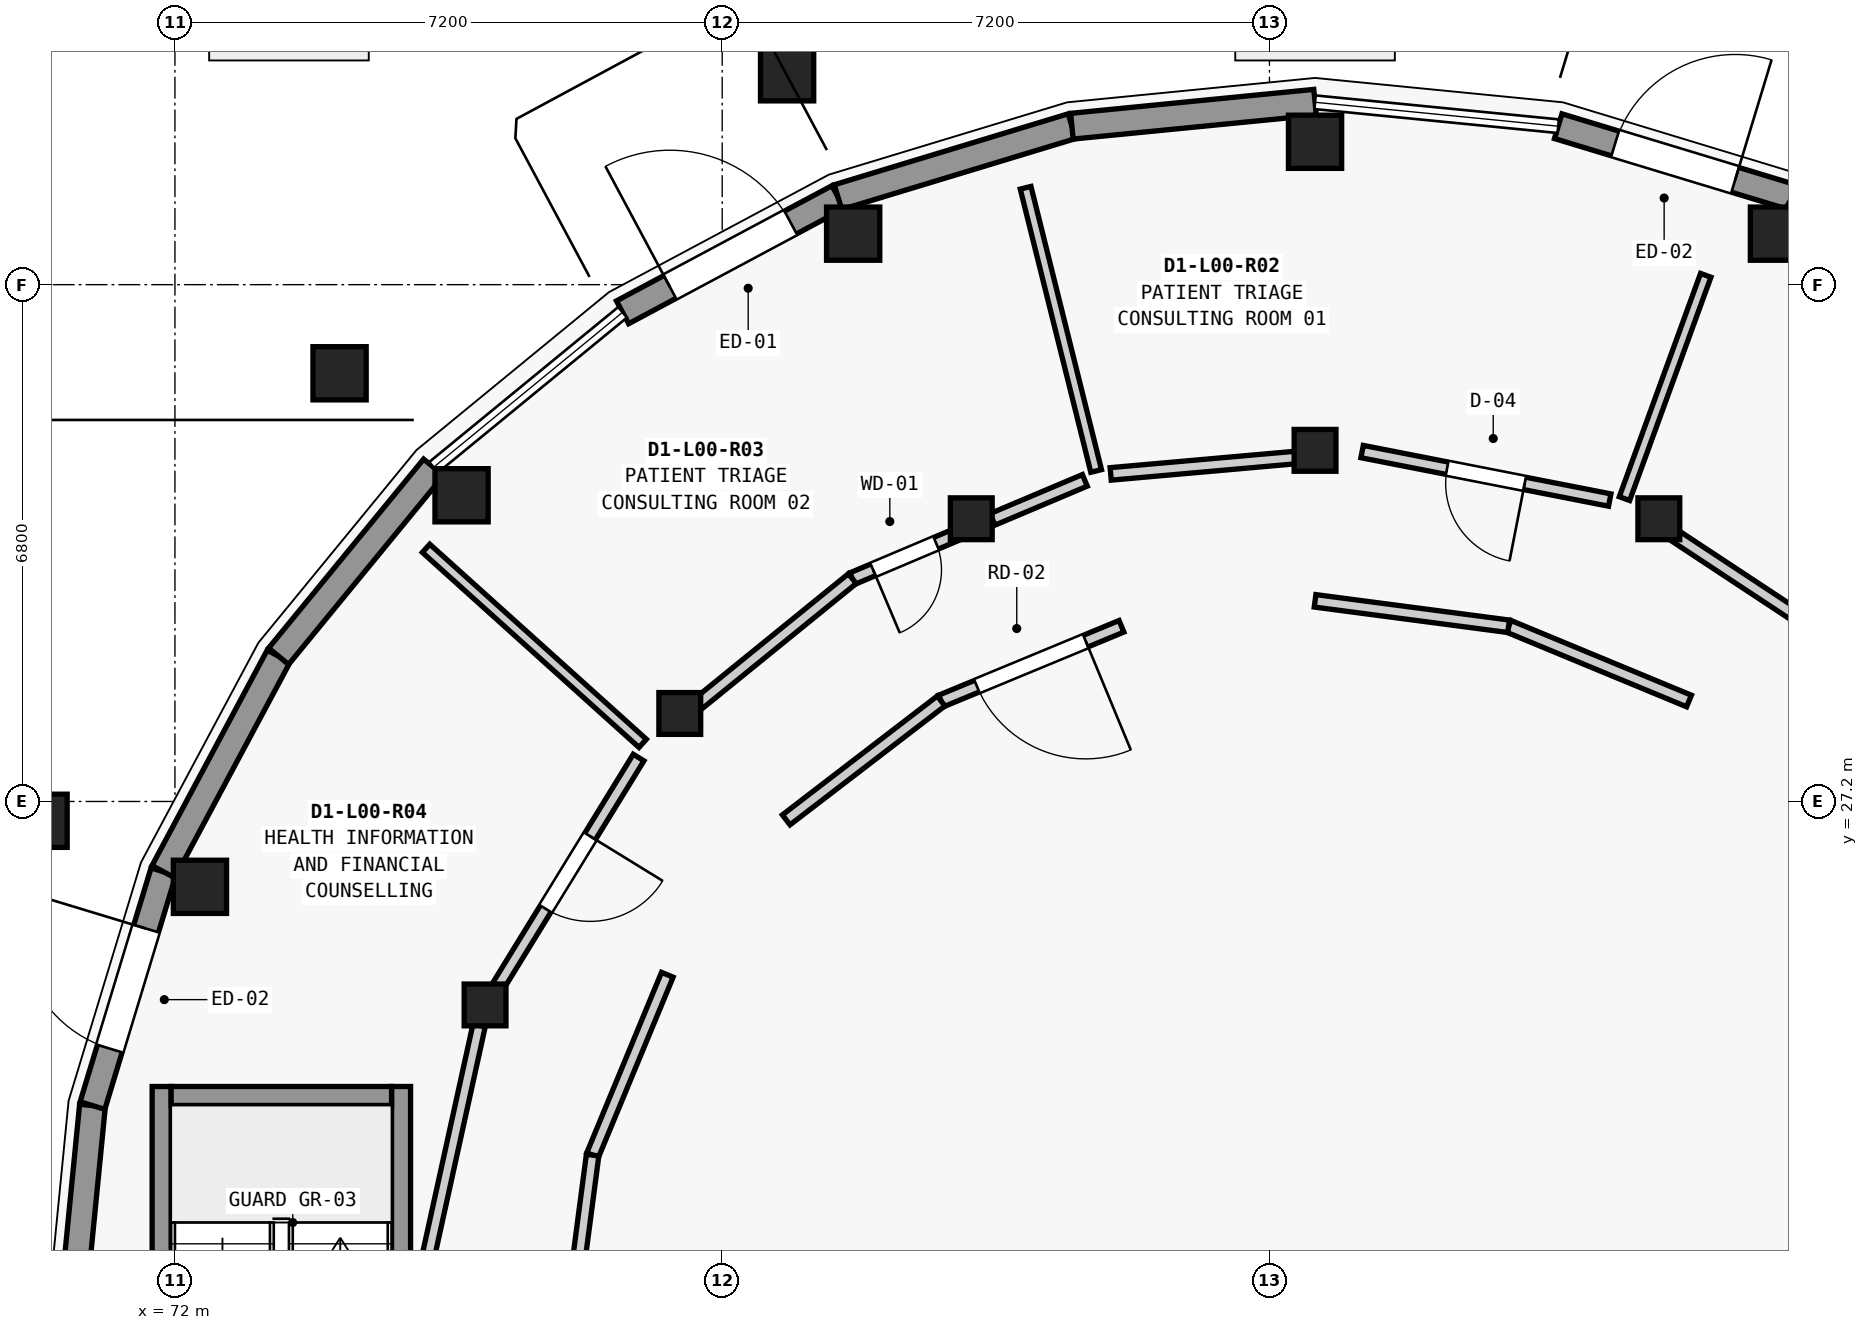
"""IFC4 building model, lengths in metres.
Left out: names, types, materials, properties, quantities, classifications, styles, units other than length and angle.
Written with IfcOpenShell. Run it as: python <this file> out.ifc"""

import sys

from ifc_helpers import new_model, si_unit, direction, frame, frame_2d, origin, origin_2d, place, context, subcontext, project, spatial, rectangle, circle, extrude, element, fill, save


model = new_model("IFC4")
c1 = context("Model", 3, precision=1e-05, world=origin(), true_north=direction((0.0, 1.0)))
c2 = subcontext(c1, "Body", "Model", "MODEL_VIEW")
j1 = project(units=[si_unit("LENGTHUNIT", "METRE"), si_unit("PLANEANGLEUNIT", "RADIAN")], contexts=[c1])
p1 = place(None, origin())
s1 = spatial("IfcSite", under=j1, at=p1, CompositionType="ELEMENT")
p2 = place(p1, origin())
s2 = spatial("IfcBuilding", under=s1, at=p2, CompositionType="ELEMENT")
p3 = place(p2, origin())
s3 = spatial("IfcBuildingStorey", under=s2, at=p3, CompositionType="ELEMENT", Elevation=0.0)
for number, where, z_axis, x_axis in (
    (1, (93.077, 34.671, 0.0), (0.0, 0.0, 1.0), (1.0, 0.0, 0.0)),
    (2, (87.0, 35.88, 0.0), (0.0, 0.0, 1.0), (1.0, 0.0, 0.0)),
    (3, (80.923, 34.671, 0.0), (0.0, 0.0, 1.0), (1.0, 0.0, 0.0)),
    (4, (75.771, 31.229, 0.0), (0.0, 0.0, 1.0), (1.0, 0.0, 0.0)),
    (5, (72.329, 26.077, 0.0), (0.0, 0.0, 1.0), (1.0, 0.0, 0.0)),
):
    element("IfcColumn", number, at=place(p3, frame(where, z_axis=z_axis, x_axis=x_axis)), inside=s3, PredefinedType="COLUMN", context=c2, shape_type="SweptSolid", body=[
        extrude(circle(Radius=0.35, at=origin_2d()), origin(), (0.0, 0.0, 1.0), 4.55),
    ])
for number, where, z_axis, x_axis in (
    (6, (91.523, 30.92, 0.0), (0.0, 0.0, 1.0), (1.0, 0.0, 0.0)),
    (7, (87.0, 31.82, 0.0), (0.0, 0.0, 1.0), (1.0, 0.0, 0.0)),
    (8, (82.477, 30.92, 0.0), (0.0, 0.0, 1.0), (1.0, 0.0, 0.0)),
    (9, (78.642, 28.358, 0.0), (0.0, 0.0, 1.0), (1.0, 0.0, 0.0)),
    (10, (76.08, 24.523, 0.0), (0.0, 0.0, 1.0), (1.0, 0.0, 0.0)),
):
    element("IfcColumn", number, at=place(p3, frame(where, z_axis=z_axis, x_axis=x_axis)), inside=s3, PredefinedType="COLUMN", context=c2, shape_type="SweptSolid", body=[
        extrude(rectangle(XDim=0.55, YDim=0.55, at=origin_2d()), origin(), (0.0, 0.0, 1.0), 4.55),
    ])
for number, where, z_axis, x_axis in (
    (11, (80.054, 36.768, 0.0), (0.0, 0.0, 1.0), (1.0, 0.0, 0.0)),
    (12, (74.166, 32.834, 0.0), (0.0, 0.0, 1.0), (1.0, 0.0, 0.0)),
    (13, (70.232, 26.946, 0.0), (0.0, 0.0, 1.0), (1.0, 0.0, 0.0)),
):
    element("IfcColumn", number, at=place(p3, frame(where, z_axis=z_axis, x_axis=x_axis)), inside=s3, PredefinedType="COLUMN", context=c2, shape_type="SweptSolid", body=[
        extrude(circle(Radius=0.35, at=origin_2d()), origin(), (0.0, 0.0, 1.0), 4.55),
    ])
p4 = place(p3, frame((70.6, 20.0, 0.0), z_axis=(0.0, 0.0, 1.0), x_axis=(0.097977057849, 0.995188673637, 0.0)))
e14 = element("IfcWall", 14, at=p4, inside=s3, PredefinedType="SOLIDWALL", context=c2, shape_type="SweptSolid", body=[
    extrude(rectangle(XDim=3.214, YDim=0.34, at=frame_2d((1.607, 0.0))), origin(), (0.0, 0.0, 1.0), 3.659),
])
p5 = place(p3, frame((70.915, 23.199, 0.0), z_axis=(0.0, 0.0, 1.0), x_axis=(0.29014016356, 0.956984161567, 0.0)))
e15 = element("IfcWall", 15, at=p5, inside=s3, PredefinedType="SOLIDWALL", context=c2, shape_type="SweptSolid", body=[
    extrude(rectangle(XDim=3.215, YDim=0.34, at=frame_2d((1.607, 0.0))), origin(), (0.0, 0.0, 1.0), 3.659),
])
p6 = place(p5, frame((0.783, 0.0, 0.0)))
e16 = element("IfcOpeningElement", 16, at=p6, cuts=e15, PredefinedType="OPENING", context=c2, shape_type="SweptSolid", body=[
    extrude(rectangle(XDim=1.65, YDim=2.45, at=frame_2d((0.825, 1.225))), frame((0.0, 0.18, 0.0), z_axis=(0.0, -1.0, 0.0), x_axis=(1.0, 0.0, 0.0)), (0.0, 0.0, 1.0), 0.36),
])
for number, where, z_axis, x_axis in (
    (17, (71.848, 26.276, 0.0), (0.0, 0.0, 1.0), (0.472, 0.882, 0.0)),
    (18, (73.364, 29.111, 0.0), (0.0, 0.0, 1.0), (0.634, 0.773, 0.0)),
):
    element("IfcWall", number, at=place(p3, frame(where, z_axis=z_axis, x_axis=x_axis)), inside=s3, PredefinedType="SOLIDWALL", context=c2, shape_type="SweptSolid", body=[
        extrude(rectangle(XDim=3.215, YDim=0.34, at=frame_2d((1.607, 0.0))), origin(), (0.0, 0.0, 1.0), 3.659),
    ])
p7 = place(p3, frame((77.889, 33.636, 0.0), z_axis=(0.0, 0.0, 1.0), x_axis=(0.881835313523, 0.47155750426, 0.0)))
e19 = element("IfcWall", 19, at=p7, inside=s3, PredefinedType="SOLIDWALL", context=c2, shape_type="SweptSolid", body=[
    extrude(rectangle(XDim=3.215, YDim=0.34, at=frame_2d((1.607, 0.0))), origin(), (0.0, 0.0, 1.0), 3.659),
])
p8 = place(p7, frame((0.707, 0.0, 0.0)))
e20 = element("IfcOpeningElement", 20, at=p8, cuts=e19, PredefinedType="OPENING", context=c2, shape_type="SweptSolid", body=[
    extrude(rectangle(XDim=1.8, YDim=2.55, at=frame_2d((0.9, 1.275))), frame((0.0, 0.18, 0.0), z_axis=(0.0, -1.0, 0.0), x_axis=(1.0, 0.0, 0.0)), (0.0, 0.0, 1.0), 0.36),
])
p9 = place(p3, frame((80.724, 35.152, 0.0), z_axis=(0.0, 0.0, 1.0), x_axis=(0.956984161567, 0.29014016356, 0.0)))
e21 = element("IfcWall", 21, at=p9, inside=s3, PredefinedType="SOLIDWALL", context=c2, shape_type="SweptSolid", body=[
    extrude(rectangle(XDim=3.215, YDim=0.34, at=frame_2d((1.607, 0.0))), origin(), (0.0, 0.0, 1.0), 3.659),
])
p10 = place(p3, frame((83.801, 36.085, 0.0), z_axis=(0.0, 0.0, 1.0), x_axis=(0.995188673637, 0.097977057849, 0.0)))
e22 = element("IfcWall", 22, at=p10, inside=s3, PredefinedType="SOLIDWALL", context=c2, shape_type="SweptSolid", body=[
    extrude(rectangle(XDim=3.214, YDim=0.34, at=frame_2d((1.607, 0.0))), origin(), (0.0, 0.0, 1.0), 3.659),
])
p11 = place(p3, frame((90.199, 36.085, 0.0), z_axis=(0.0, 0.0, 1.0), x_axis=(0.956984161567, -0.29014016356, 0.0)))
e23 = element("IfcWall", 23, at=p11, inside=s3, PredefinedType="SOLIDWALL", context=c2, shape_type="SweptSolid", body=[
    extrude(rectangle(XDim=3.215, YDim=0.34, at=frame_2d((1.607, 0.0))), origin(), (0.0, 0.0, 1.0), 3.659),
])
p12 = place(p11, frame((0.783, 0.0, 0.0)))
e24 = element("IfcOpeningElement", 24, at=p12, cuts=e23, PredefinedType="OPENING", context=c2, shape_type="SweptSolid", body=[
    extrude(rectangle(XDim=1.65, YDim=2.45, at=frame_2d((0.825, 1.225))), frame((0.0, 0.18, 0.0), z_axis=(0.0, -1.0, 0.0), x_axis=(1.0, 0.0, 0.0)), (0.0, 0.0, 1.0), 0.36),
])
p13 = place(p3, frame((93.276, 35.152, 0.0), z_axis=(0.0, 0.0, 1.0), x_axis=(0.881835313523, -0.47155750426, 0.0)))
e25 = element("IfcWall", 25, at=p13, inside=s3, PredefinedType="SOLIDWALL", context=c2, shape_type="SweptSolid", body=[
    extrude(rectangle(XDim=3.215, YDim=0.34, at=frame_2d((1.607, 0.0))), origin(), (0.0, 0.0, 1.0), 3.659),
])
p14 = place(p3, frame((74.975, 16.55, 0.0), z_axis=(0.0, 0.0, 1.0), x_axis=(0.0, 1.0, 0.0)))
e26 = element("IfcWall", 26, at=p14, inside=s3, PredefinedType="SHEAR", context=c2, shape_type="SweptSolid", body=[
    extrude(rectangle(XDim=6.9, YDim=0.25, at=frame_2d((3.45, 0.0))), origin(), (0.0, 0.0, 1.0), 4.305),
])
p15 = place(p14, frame((0.43, 0.0, 0.0)))
e27 = element("IfcOpeningElement", 27, at=p15, cuts=e26, PredefinedType="OPENING", context=c2, shape_type="SweptSolid", body=[
    extrude(rectangle(XDim=1.1, YDim=2.15, at=frame_2d((0.55, 1.075))), frame((0.0, 0.135, 0.0), z_axis=(0.0, -1.0, 0.0), x_axis=(1.0, 0.0, 0.0)), (0.0, 0.0, 1.0), 0.27),
])
p16 = place(p3, frame((71.825, 16.55, 0.0), z_axis=(0.0, 0.0, 1.0), x_axis=(0.0, 1.0, 0.0)))
e28 = element("IfcWall", 28, at=p16, inside=s3, PredefinedType="SHEAR", context=c2, shape_type="SweptSolid", body=[
    extrude(rectangle(XDim=6.9, YDim=0.25, at=frame_2d((3.45, 0.0))), origin(), (0.0, 0.0, 1.0), 4.305),
])
p17 = place(p3, frame((74.85, 23.325, 0.0), z_axis=(0.0, 0.0, 1.0), x_axis=(-1.0, 0.0, 0.0)))
e29 = element("IfcWall", 29, at=p17, inside=s3, PredefinedType="SHEAR", context=c2, shape_type="SweptSolid", body=[
    extrude(rectangle(XDim=2.9, YDim=0.25, at=frame_2d((1.45, 0.0))), origin(), (0.0, 0.0, 1.0), 4.305),
])
p18 = place(p3, frame((91.92, 28.522, 0.0), z_axis=(0.0, 0.0, 1.0), x_axis=(-0.923870848353, 0.382704397106, 0.0)))
e30 = element("IfcWall", 30, at=p18, inside=s3, PredefinedType="PARTITIONING", context=c2, shape_type="SweptSolid", body=[
    extrude(rectangle(XDim=2.568, YDim=0.165, at=frame_2d((1.284, 0.0))), origin(), (0.0, 0.0, 1.0), 3.634),
])
p19 = place(p3, frame((89.547, 29.505, 0.0), z_axis=(0.0, 0.0, 1.0), x_axis=(-0.991451384224, 0.130476636685, 0.0)))
e31 = element("IfcWall", 31, at=p19, inside=s3, PredefinedType="PARTITIONING", context=c2, shape_type="SweptSolid", body=[
    extrude(rectangle(XDim=2.569, YDim=0.165, at=frame_2d((1.285, 0.0))), origin(), (0.0, 0.0, 1.0), 3.634),
])
p20 = place(p3, frame((84.453, 29.505, 0.0), z_axis=(0.0, 0.0, 1.0), x_axis=(-0.923870848353, -0.382704397106, 0.0)))
e32 = element("IfcWall", 32, at=p20, inside=s3, PredefinedType="PARTITIONING", context=c2, shape_type="SweptSolid", body=[
    extrude(rectangle(XDim=2.568, YDim=0.165, at=frame_2d((1.284, 0.0))), origin(), (0.0, 0.0, 1.0), 3.634),
])
p21 = place(p20, frame((0.509, 0.0, 0.0)))
e33 = element("IfcOpeningElement", 33, at=p21, cuts=e32, PredefinedType="OPENING", context=c2, shape_type="SweptSolid", body=[
    extrude(rectangle(XDim=1.55, YDim=2.35, at=frame_2d((0.775, 1.175))), frame((0.0, 0.093, 0.0), z_axis=(0.0, -1.0, 0.0), x_axis=(1.0, 0.0, 0.0)), (0.0, 0.0, 1.0), 0.185),
])
p22 = place(p3, frame((82.08, 28.522, 0.0), z_axis=(0.0, 0.0, 1.0), x_axis=(-0.793337078322, -0.608782621434, 0.0)))
e34 = element("IfcWall", 34, at=p22, inside=s3, PredefinedType="PARTITIONING", context=c2, shape_type="SweptSolid", body=[
    extrude(rectangle(XDim=2.569, YDim=0.165, at=frame_2d((1.285, 0.0))), origin(), (0.0, 0.0, 1.0), 3.634),
])
p23 = place(p3, frame((78.478, 24.92, 0.0), z_axis=(0.0, 0.0, 1.0), x_axis=(-0.382704397106, -0.923870848353, 0.0)))
e35 = element("IfcWall", 35, at=p23, inside=s3, PredefinedType="PARTITIONING", context=c2, shape_type="SweptSolid", body=[
    extrude(rectangle(XDim=2.568, YDim=0.165, at=frame_2d((1.284, 0.0))), origin(), (0.0, 0.0, 1.0), 3.634),
])
p24 = place(p3, frame((77.495, 22.547, 0.0), z_axis=(0.0, 0.0, 1.0), x_axis=(-0.130476636685, -0.991451384224, 0.0)))
e36 = element("IfcWall", 36, at=p24, inside=s3, PredefinedType="PARTITIONING", context=c2, shape_type="SweptSolid", body=[
    extrude(rectangle(XDim=2.569, YDim=0.165, at=frame_2d((1.285, 0.0))), origin(), (0.0, 0.0, 1.0), 3.634),
])
p25 = place(p3, frame((91.071, 31.185, 0.0), z_axis=(0.0, 0.0, 1.0), x_axis=(0.341881000608, 0.939743252928, 0.0)))
e37 = element("IfcWall", 37, at=p25, inside=s3, PredefinedType="PARTITIONING", context=c2, shape_type="SweptSolid", body=[
    extrude(rectangle(XDim=3.126, YDim=0.145, at=frame_2d((1.563, 0.0))), origin(), (0.0, 0.0, 1.0), 3.634),
])
p26 = place(p3, frame((84.12, 31.549, 0.0), z_axis=(0.0, 0.0, 1.0), x_axis=(-0.241742626418, 0.970340405514, 0.0)))
e38 = element("IfcWall", 38, at=p26, inside=s3, PredefinedType="PARTITIONING", context=c2, shape_type="SweptSolid", body=[
    extrude(rectangle(XDim=3.84, YDim=0.145, at=frame_2d((1.92, 0.0))), origin(), (0.0, 0.0, 1.0), 3.634),
])
p27 = place(p3, frame((78.154, 27.965, 0.0), z_axis=(0.0, 0.0, 1.0), x_axis=(-0.74318650969, 0.66908430845, 0.0)))
e39 = element("IfcWall", 39, at=p27, inside=s3, PredefinedType="PARTITIONING", context=c2, shape_type="SweptSolid", body=[
    extrude(rectangle(XDim=3.835, YDim=0.145, at=frame_2d((1.917, 0.0))), origin(), (0.0, 0.0, 1.0), 3.634),
])
p28 = place(p3, frame((95.104, 28.474, 0.0), z_axis=(0.0, 0.0, 1.0), x_axis=(-0.834683396139, 0.55073008653, 0.0)))
e40 = element("IfcWall", 40, at=p28, inside=s3, PredefinedType="PARTITIONING", context=c2, shape_type="SweptSolid", body=[
    extrude(rectangle(XDim=4.065, YDim=0.165, at=frame_2d((2.033, 0.0))), origin(), (0.0, 0.0, 1.0), 3.634),
])
p29 = place(p3, frame((90.877, 31.166, 0.0), z_axis=(0.0, 0.0, 1.0), x_axis=(-0.981364628343, 0.192154797592, 0.0)))
e41 = element("IfcWall", 41, at=p29, inside=s3, PredefinedType="PARTITIONING", context=c2, shape_type="SweptSolid", body=[
    extrude(rectangle(XDim=3.32, YDim=0.165, at=frame_2d((1.66, 0.0))), origin(), (0.0, 0.0, 1.0), 3.634),
])
p30 = place(p29, frame((1.14, 0.0, 0.0)))
e42 = element("IfcOpeningElement", 42, at=p30, cuts=e41, PredefinedType="OPENING", context=c2, shape_type="SweptSolid", body=[
    extrude(rectangle(XDim=1.04, YDim=2.14, at=frame_2d((0.52, 1.07))), frame((0.0, 0.093, 0.0), z_axis=(0.0, -1.0, 0.0), x_axis=(1.0, 0.0, 0.0)), (0.0, 0.0, 1.0), 0.185),
])
p31 = place(p3, frame((86.737, 31.725, 0.0), z_axis=(0.0, 0.0, 1.0), x_axis=(-0.996092849472, -0.088312146562, 0.0)))
e43 = element("IfcWall", 43, at=p31, inside=s3, PredefinedType="PARTITIONING", context=c2, shape_type="SweptSolid", body=[
    extrude(rectangle(XDim=2.436, YDim=0.165, at=frame_2d((1.218, 0.0))), origin(), (0.0, 0.0, 1.0), 3.634),
])
p32 = place(p3, frame((83.971, 31.425, 0.0), z_axis=(0.0, 0.0, 1.0), x_axis=(-0.921135925223, -0.389241065747, 0.0)))
e44 = element("IfcWall", 44, at=p32, inside=s3, PredefinedType="PARTITIONING", context=c2, shape_type="SweptSolid", body=[
    extrude(rectangle(XDim=1.318, YDim=0.165, at=frame_2d((0.659, 0.0))), origin(), (0.0, 0.0, 1.0), 3.634),
])
p33 = place(p3, frame((82.288, 30.714, 0.0), z_axis=(0.0, 0.0, 1.0), x_axis=(-0.920994313444, -0.38957601903, 0.0)))
e45 = element("IfcWall", 45, at=p33, inside=s3, PredefinedType="PARTITIONING", context=c2, shape_type="SweptSolid", body=[
    extrude(rectangle(XDim=1.494, YDim=0.165, at=frame_2d((0.747, 0.0))), origin(), (0.0, 0.0, 1.0), 3.634),
])
p34 = place(p33, frame((0.297, 0.0, 0.0)))
e46 = element("IfcOpeningElement", 46, at=p34, cuts=e45, PredefinedType="OPENING", context=c2, shape_type="SweptSolid", body=[
    extrude(rectangle(XDim=0.9, YDim=2.1, at=frame_2d((0.45, 1.05))), frame((0.0, 0.093, 0.0), z_axis=(0.0, -1.0, 0.0), x_axis=(1.0, 0.0, 0.0)), (0.0, 0.0, 1.0), 0.185),
])
p35 = place(p3, frame((80.912, 30.132, 0.0), z_axis=(0.0, 0.0, 1.0), x_axis=(-0.776260107644, -0.630412757867, 0.0)))
e47 = element("IfcWall", 47, at=p35, inside=s3, PredefinedType="PARTITIONING", context=c2, shape_type="SweptSolid", body=[
    extrude(rectangle(XDim=2.606, YDim=0.165, at=frame_2d((1.303, 0.0))), origin(), (0.0, 0.0, 1.0), 3.634),
])
p36 = place(p3, frame((78.1, 27.778, 0.0), z_axis=(0.0, 0.0, 1.0), x_axis=(-0.523664025943, -0.851924872235, 0.0)))
e48 = element("IfcWall", 48, at=p36, inside=s3, PredefinedType="PARTITIONING", context=c2, shape_type="SweptSolid", body=[
    extrude(rectangle(XDim=3.552, YDim=0.165, at=frame_2d((1.776, 0.0))), origin(), (0.0, 0.0, 1.0), 3.634),
])
p37 = place(p36, frame((1.216, 0.0, 0.0)))
e49 = element("IfcOpeningElement", 49, at=p37, cuts=e48, PredefinedType="OPENING", context=c2, shape_type="SweptSolid", body=[
    extrude(rectangle(XDim=1.12, YDim=2.16, at=frame_2d((0.56, 1.08))), frame((0.0, 0.093, 0.0), z_axis=(0.0, -1.0, 0.0), x_axis=(1.0, 0.0, 0.0)), (0.0, 0.0, 1.0), 0.185),
])
p38 = place(p3, frame((76.002, 24.254, 0.0), z_axis=(0.0, 0.0, 1.0), x_axis=(-0.215002164485, -0.976613572129, 0.0)))
e50 = element("IfcWall", 50, at=p38, inside=s3, PredefinedType="PARTITIONING", context=c2, shape_type="SweptSolid", body=[
    extrude(rectangle(XDim=3.218, YDim=0.165, at=frame_2d((1.609, 0.0))), origin(), (0.0, 0.0, 1.0), 3.634),
])
p39 = place(p6, origin())
e51 = element("IfcDoor", 51, at=p39, inside=s3, OperationType="SINGLE_SWING_RIGHT", PredefinedType="DOOR", context=c2, shape_type="SweptSolid", body=[
    extrude(rectangle(XDim=1.65, YDim=2.45, at=frame_2d((0.825, 1.225))), frame((0.0, 0.025, 0.0), z_axis=(0.0, -1.0, 0.0), x_axis=(1.0, 0.0, 0.0)), (0.0, 0.0, 1.0), 0.05),
])
fill(e16, e51)
p40 = place(p8, origin())
e52 = element("IfcDoor", 52, at=p40, inside=s3, OperationType="SINGLE_SWING_LEFT", PredefinedType="DOOR", context=c2, shape_type="SweptSolid", body=[
    extrude(rectangle(XDim=1.8, YDim=2.55, at=frame_2d((0.9, 1.275))), frame((0.0, 0.025, 0.0), z_axis=(0.0, -1.0, 0.0), x_axis=(1.0, 0.0, 0.0)), (0.0, 0.0, 1.0), 0.05),
])
fill(e20, e52)
p41 = place(p12, origin())
e53 = element("IfcDoor", 53, at=p41, inside=s3, OperationType="SINGLE_SWING_RIGHT", PredefinedType="DOOR", context=c2, shape_type="SweptSolid", body=[
    extrude(rectangle(XDim=1.65, YDim=2.45, at=frame_2d((0.825, 1.225))), frame((0.0, 0.025, 0.0), z_axis=(0.0, -1.0, 0.0), x_axis=(1.0, 0.0, 0.0)), (0.0, 0.0, 1.0), 0.05),
])
fill(e24, e53)
p42 = place(p21, origin())
e54 = element("IfcDoor", 54, at=p42, inside=s3, OperationType="SINGLE_SWING_LEFT", PredefinedType="DOOR", context=c2, shape_type="SweptSolid", body=[
    extrude(rectangle(XDim=1.55, YDim=2.35, at=frame_2d((0.775, 1.175))), frame((0.0, 0.025, 0.0), z_axis=(0.0, -1.0, 0.0), x_axis=(1.0, 0.0, 0.0)), (0.0, 0.0, 1.0), 0.05),
])
fill(e33, e54)
p43 = place(p30, origin())
e55 = element("IfcDoor", 55, at=p43, inside=s3, OperationType="SINGLE_SWING_LEFT", PredefinedType="DOOR", context=c2, shape_type="SweptSolid", body=[
    extrude(rectangle(XDim=1.04, YDim=2.14, at=frame_2d((0.52, 1.07))), frame((0.0, 0.025, 0.0), z_axis=(0.0, -1.0, 0.0), x_axis=(1.0, 0.0, 0.0)), (0.0, 0.0, 1.0), 0.05),
])
fill(e42, e55)
p44 = place(p34, origin())
e56 = element("IfcDoor", 56, at=p44, inside=s3, OperationType="SINGLE_SWING_RIGHT", PredefinedType="DOOR", context=c2, shape_type="SweptSolid", body=[
    extrude(rectangle(XDim=0.9, YDim=2.1, at=frame_2d((0.45, 1.05))), frame((0.0, 0.025, 0.0), z_axis=(0.0, -1.0, 0.0), x_axis=(1.0, 0.0, 0.0)), (0.0, 0.0, 1.0), 0.05),
])
fill(e46, e56)
p45 = place(p37, origin())
e57 = element("IfcDoor", 57, at=p45, inside=s3, OperationType="SINGLE_SWING_LEFT", PredefinedType="DOOR", context=c2, shape_type="SweptSolid", body=[
    extrude(rectangle(XDim=1.12, YDim=2.16, at=frame_2d((0.56, 1.08))), frame((0.0, 0.025, 0.0), z_axis=(0.0, -1.0, 0.0), x_axis=(1.0, 0.0, 0.0)), (0.0, 0.0, 1.0), 0.05),
])
fill(e49, e57)
save(model, sys.argv[1])
